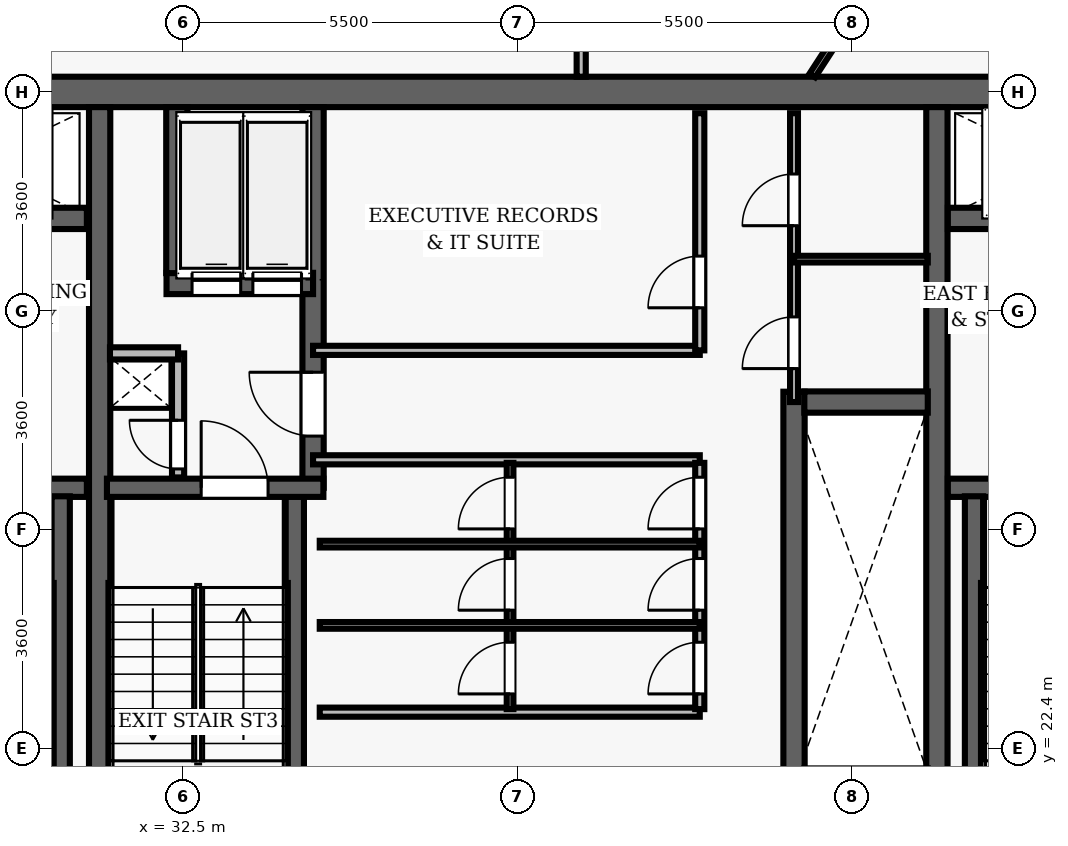
"""IFC4 building model, lengths in metres.
Left out: names, types, materials, properties, quantities, classifications, styles, units other than length and angle.
Written with IfcOpenShell. Run it as: python <this file> out.ifc"""

import sys

from ifc_helpers import new_model, si_unit, direction, frame, frame_2d, origin, place, context, subcontext, project, spatial, rectangle, extrude, element, fill, save


model = new_model("IFC4")
c1 = context("Model", 3, precision=1e-05, world=origin(), true_north=direction((0.0, 1.0)))
c2 = subcontext(c1, "Body", "Model", "MODEL_VIEW")
j1 = project(units=[si_unit("LENGTHUNIT", "METRE"), si_unit("PLANEANGLEUNIT", "RADIAN")], contexts=[c1])
p1 = place(None, origin())
s1 = spatial("IfcSite", under=j1, at=p1, CompositionType="ELEMENT")
p2 = place(p1, origin())
s2 = spatial("IfcBuilding", under=s1, at=p2, CompositionType="ELEMENT")
p3 = place(p2, frame((0.0, 0.0, 225.1)))
s3 = spatial("IfcBuildingStorey", under=s2, at=p3, CompositionType="ELEMENT", Elevation=225.1)
p4 = place(p3, frame((26.75, 33.2, 0.0), z_axis=(0.0, 0.0, 1.0), x_axis=(1.0, 0.0, 0.0)))
e1 = element("IfcWall", 1, at=p4, inside=s3, PredefinedType="SHEAR", context=c2, shape_type="SweptSolid", body=[
    extrude(rectangle(XDim=22.5, YDim=0.5, at=frame_2d((11.25, 0.0))), origin(), (0.0, 0.0, 1.0), 3.85),
])
for number, where, z_axis, x_axis in (
    (2, (31.13, 19.05, 0.0), (0.0, 0.0, 1.0), (0.0, 1.0, 0.0)),
    (3, (44.9, 19.05, 0.0), (0.0, 0.0, 1.0), (0.0, 1.0, 0.0)),
):
    element("IfcWall", number, at=place(p3, frame(where, z_axis=z_axis, x_axis=x_axis)), inside=s3, PredefinedType="SHEAR", context=c2, shape_type="SweptSolid", body=[
        extrude(rectangle(XDim=13.9, YDim=0.35, at=frame_2d((6.95, 0.0))), origin(), (0.0, 0.0, 1.0), 3.85),
    ])
p5 = place(p3, frame((27.25, 26.69, 0.0), z_axis=(0.0, 0.0, 1.0), x_axis=(1.0, 0.0, 0.0)))
e4 = element("IfcWall", 4, at=p5, inside=s3, PredefinedType="SHEAR", context=c2, shape_type="SweptSolid", body=[
    extrude(rectangle(XDim=3.67, YDim=0.3, at=frame_2d((1.835, 0.0))), origin(), (0.0, 0.0, 1.0), 3.85),
])
p6 = place(p5, frame((1.05, 0.0, 0.0)))
e5 = element("IfcOpeningElement", 5, at=p6, cuts=e4, PredefinedType="OPENING", context=c2, shape_type="SweptSolid", body=[
    extrude(rectangle(XDim=1.1, YDim=2.15, at=frame_2d((0.55, 1.075))), frame((0.0, 0.16, 0.0), z_axis=(0.0, -1.0, 0.0), x_axis=(1.0, 0.0, 0.0)), (0.0, 0.0, 1.0), 0.32),
])
p7 = place(p3, frame((30.49, 19.05, 0.0), z_axis=(0.0, 0.0, 1.0), x_axis=(0.0, 1.0, 0.0)))
e6 = element("IfcWall", 6, at=p7, inside=s3, PredefinedType="SHEAR", context=c2, shape_type="SweptSolid", body=[
    extrude(rectangle(XDim=7.5, YDim=0.3, at=frame_2d((3.75, 0.0))), origin(), (0.0, 0.0, 1.0), 3.85),
])
p8 = place(p3, frame((27.25, 31.12, 0.0), z_axis=(0.0, 0.0, 1.0), x_axis=(1.0, 0.0, 0.0)))
e7 = element("IfcWall", 7, at=p8, inside=s3, PredefinedType="SHEAR", context=c2, shape_type="SweptSolid", body=[
    extrude(rectangle(XDim=3.67, YDim=0.35, at=frame_2d((1.835, 0.0))), origin(), (0.0, 0.0, 1.0), 3.035),
])
p9 = place(p8, frame((1.25, 0.0, 0.0)))
e8 = element("IfcOpeningElement", 8, at=p9, cuts=e7, PredefinedType="OPENING", context=c2, shape_type="SweptSolid", body=[
    extrude(rectangle(XDim=1.1, YDim=2.15, at=frame_2d((0.55, 1.075))), frame((0.0, 0.185, 0.0), z_axis=(0.0, -1.0, 0.0), x_axis=(1.0, 0.0, 0.0)), (0.0, 0.0, 1.0), 0.37),
])
p10 = place(p3, frame((45.08, 26.69, 0.0), z_axis=(0.0, 0.0, 1.0), x_axis=(1.0, 0.0, 0.0)))
e9 = element("IfcWall", 9, at=p10, inside=s3, PredefinedType="SHEAR", context=c2, shape_type="SweptSolid", body=[
    extrude(rectangle(XDim=3.67, YDim=0.3, at=frame_2d((1.835, 0.0))), origin(), (0.0, 0.0, 1.0), 3.85),
])
p11 = place(p10, frame((1.05, 0.0, 0.0)))
e10 = element("IfcOpeningElement", 10, at=p11, cuts=e9, PredefinedType="OPENING", context=c2, shape_type="SweptSolid", body=[
    extrude(rectangle(XDim=1.1, YDim=2.15, at=frame_2d((0.55, 1.075))), frame((0.0, 0.16, 0.0), z_axis=(0.0, -1.0, 0.0), x_axis=(1.0, 0.0, 0.0)), (0.0, 0.0, 1.0), 0.32),
])
p12 = place(p3, frame((45.51, 19.05, 0.0), z_axis=(0.0, 0.0, 1.0), x_axis=(0.0, 1.0, 0.0)))
e11 = element("IfcWall", 11, at=p12, inside=s3, PredefinedType="SHEAR", context=c2, shape_type="SweptSolid", body=[
    extrude(rectangle(XDim=7.5, YDim=0.3, at=frame_2d((3.75, 0.0))), origin(), (0.0, 0.0, 1.0), 3.85),
])
p13 = place(p3, frame((45.08, 31.12, 0.0), z_axis=(0.0, 0.0, 1.0), x_axis=(1.0, 0.0, 0.0)))
e12 = element("IfcWall", 12, at=p13, inside=s3, PredefinedType="SHEAR", context=c2, shape_type="SweptSolid", body=[
    extrude(rectangle(XDim=3.67, YDim=0.35, at=frame_2d((1.835, 0.0))), origin(), (0.0, 0.0, 1.0), 3.035),
])
p14 = place(p13, frame((1.25, 0.0, 0.0)))
e13 = element("IfcOpeningElement", 13, at=p14, cuts=e12, PredefinedType="OPENING", context=c2, shape_type="SweptSolid", body=[
    extrude(rectangle(XDim=1.1, YDim=2.15, at=frame_2d((0.55, 1.075))), frame((0.0, 0.185, 0.0), z_axis=(0.0, -1.0, 0.0), x_axis=(1.0, 0.0, 0.0)), (0.0, 0.0, 1.0), 0.37),
])
p15 = place(p3, frame((34.34, 19.05, 0.0), z_axis=(0.0, 0.0, 1.0), x_axis=(0.0, 1.0, 0.0)))
e14 = element("IfcWall", 14, at=p15, inside=s3, PredefinedType="SHEAR", context=c2, shape_type="SweptSolid", body=[
    extrude(rectangle(XDim=7.5, YDim=0.3, at=frame_2d((3.75, 0.0))), origin(), (0.0, 0.0, 1.0), 3.85),
])
p16 = place(p3, frame((34.64, 26.69, 0.0), z_axis=(0.0, 0.0, 1.0), x_axis=(0.0, 1.0, 0.0)))
e15 = element("IfcWall", 15, at=p16, inside=s3, PredefinedType="SHEAR", context=c2, shape_type="SweptSolid", body=[
    extrude(rectangle(XDim=6.26, YDim=0.35, at=frame_2d((3.13, 0.0))), origin(), (0.0, 0.0, 1.0), 3.85),
])
p17 = place(p16, frame((0.85, 0.0, 0.0)))
e16 = element("IfcOpeningElement", 16, at=p17, cuts=e15, PredefinedType="OPENING", context=c2, shape_type="SweptSolid", body=[
    extrude(rectangle(XDim=1.05, YDim=2.15, at=frame_2d((0.525, 1.075))), frame((0.0, 0.185, 0.0), z_axis=(0.0, -1.0, 0.0), x_axis=(1.0, 0.0, 0.0)), (0.0, 0.0, 1.0), 0.37),
])
p18 = place(p3, frame((31.25, 26.69, 0.0), z_axis=(0.0, 0.0, 1.0), x_axis=(1.0, 0.0, 0.0)))
e17 = element("IfcWall", 17, at=p18, inside=s3, PredefinedType="SHEAR", context=c2, shape_type="SweptSolid", body=[
    extrude(rectangle(XDim=3.56, YDim=0.3, at=frame_2d((1.78, 0.0))), origin(), (0.0, 0.0, 1.0), 3.85),
])
p19 = place(p18, frame((1.55, 0.0, 0.0)))
e18 = element("IfcOpeningElement", 18, at=p19, cuts=e17, PredefinedType="OPENING", context=c2, shape_type="SweptSolid", body=[
    extrude(rectangle(XDim=1.1, YDim=2.15, at=frame_2d((0.55, 1.075))), frame((0.0, 0.16, 0.0), z_axis=(0.0, -1.0, 0.0), x_axis=(1.0, 0.0, 0.0)), (0.0, 0.0, 1.0), 0.32),
])
p20 = place(p3, frame((32.23, 30.05, 0.0), z_axis=(0.0, 0.0, 1.0), x_axis=(1.0, 0.0, 0.0)))
e19 = element("IfcWall", 19, at=p20, inside=s3, PredefinedType="SHEAR", context=c2, shape_type="SweptSolid", body=[
    extrude(rectangle(XDim=2.41, YDim=0.35, at=frame_2d((1.205, 0.0))), origin(), (0.0, 0.0, 1.0), 3.035),
])
p21 = place(p20, frame((0.42, 0.0, 0.0)))
e20 = element("IfcOpeningElement", 20, at=p21, cuts=e19, PredefinedType="OPENING", context=c2, shape_type="SweptSolid", body=[
    extrude(rectangle(XDim=0.8, YDim=2.15, at=frame_2d((0.4, 1.075))), frame((0.0, 0.185, 0.0), z_axis=(0.0, -1.0, 0.0), x_axis=(1.0, 0.0, 0.0)), (0.0, 0.0, 1.0), 0.37),
])
p22 = place(p20, frame((1.42, 0.0, 0.0)))
e21 = element("IfcOpeningElement", 21, at=p22, cuts=e19, PredefinedType="OPENING", context=c2, shape_type="SweptSolid", body=[
    extrude(rectangle(XDim=0.8, YDim=2.15, at=frame_2d((0.4, 1.075))), frame((0.0, 0.185, 0.0), z_axis=(0.0, -1.0, 0.0), x_axis=(1.0, 0.0, 0.0)), (0.0, 0.0, 1.0), 0.37),
])
p23 = place(p3, frame((32.4, 30.22, 0.0), z_axis=(0.0, 0.0, 1.0), x_axis=(0.0, 1.0, 0.0)))
e22 = element("IfcWall", 22, at=p23, inside=s3, PredefinedType="SHEAR", context=c2, shape_type="SweptSolid", body=[
    extrude(rectangle(XDim=2.73, YDim=0.35, at=frame_2d((1.365, 0.0))), origin(), (0.0, 0.0, 1.0), 3.035),
])
p24 = place(p3, frame((32.42, 26.86, 0.0), z_axis=(0.0, 0.0, 1.0), x_axis=(0.0, 1.0, 0.0)))
e23 = element("IfcWall", 23, at=p24, inside=s3, PredefinedType="PARTITIONING", context=c2, shape_type="SweptSolid", body=[
    extrude(rectangle(XDim=2.04, YDim=0.2, at=frame_2d((1.02, 0.0))), origin(), (0.0, 0.0, 1.0), 3.035),
])
p25 = place(p24, frame((0.14, 0.0, 0.0)))
e24 = element("IfcOpeningElement", 24, at=p25, cuts=e23, PredefinedType="OPENING", context=c2, shape_type="SweptSolid", body=[
    extrude(rectangle(XDim=0.8, YDim=2.05, at=frame_2d((0.4, 1.025))), frame((0.0, 0.11, 0.0), z_axis=(0.0, -1.0, 0.0), x_axis=(1.0, 0.0, 0.0)), (0.0, 0.0, 1.0), 0.22),
])
p26 = place(p3, frame((31.3, 28.9, 0.0), z_axis=(0.0, 0.0, 1.0), x_axis=(1.0, 0.0, 0.0)))
e25 = element("IfcWall", 25, at=p26, inside=s3, PredefinedType="PARTITIONING", context=c2, shape_type="SweptSolid", body=[
    extrude(rectangle(XDim=1.12, YDim=0.2, at=frame_2d((0.56, 0.0))), origin(), (0.0, 0.0, 1.0), 3.035),
])
p27 = place(p3, frame((42.55, 21.73, 0.0), z_axis=(0.0, 0.0, 1.0), x_axis=(0.0, 1.0, 0.0)))
e26 = element("IfcWall", 26, at=p27, inside=s3, PredefinedType="SHEAR", context=c2, shape_type="SweptSolid", body=[
    extrude(rectangle(XDim=6.54, YDim=0.35, at=frame_2d((3.27, 0.0))), origin(), (0.0, 0.0, 1.0), 3.035),
])
p28 = place(p3, frame((42.72, 28.1, 0.0), z_axis=(0.0, 0.0, 1.0), x_axis=(1.0, 0.0, 0.0)))
e27 = element("IfcWall", 27, at=p28, inside=s3, PredefinedType="SHEAR", context=c2, shape_type="SweptSolid", body=[
    extrude(rectangle(XDim=2.03, YDim=0.35, at=frame_2d((1.015, 0.0))), origin(), (0.0, 0.0, 1.0), 3.035),
])
p29 = place(p3, frame((34.75, 23.0, 0.0), z_axis=(0.0, 0.0, 1.0), x_axis=(1.0, 0.0, 0.0)))
e28 = element("IfcWall", 28, at=p29, inside=s3, PredefinedType="PARTITIONING", context=c2, shape_type="SweptSolid", body=[
    extrude(rectangle(XDim=6.25, YDim=0.15, at=frame_2d((3.125, 0.0))), origin(), (0.0, 0.0, 1.0), 3.035),
])
for number, where, z_axis, x_axis in (
    (29, (34.64, 27.15, 0.0), (0.0, 0.0, 1.0), (1.0, 0.0, 0.0)),
    (30, (34.64, 28.95, 0.0), (0.0, 0.0, 1.0), (1.0, 0.0, 0.0)),
):
    element("IfcWall", number, at=place(p3, frame(where, z_axis=z_axis, x_axis=x_axis)), inside=s3, PredefinedType="PARTITIONING", context=c2, shape_type="SweptSolid", body=[
        extrude(rectangle(XDim=6.36, YDim=0.15, at=frame_2d((3.18, 0.0))), origin(), (0.0, 0.0, 1.0), 3.035),
    ])
p30 = place(p3, frame((41.0, 28.95, 0.0), z_axis=(0.0, 0.0, 1.0), x_axis=(0.0, 1.0, 0.0)))
e31 = element("IfcWall", 31, at=p30, inside=s3, PredefinedType="PARTITIONING", context=c2, shape_type="SweptSolid", body=[
    extrude(rectangle(XDim=3.9, YDim=0.15, at=frame_2d((1.95, 0.0))), origin(), (0.0, 0.0, 1.0), 3.035),
])
p31 = place(p30, frame((0.7, 0.0, 0.0)))
e32 = element("IfcOpeningElement", 32, at=p31, cuts=e31, PredefinedType="OPENING", context=c2, shape_type="SweptSolid", body=[
    extrude(rectangle(XDim=0.85, YDim=2.1, at=frame_2d((0.425, 1.05))), frame((0.0, 0.085, 0.0), z_axis=(0.0, -1.0, 0.0), x_axis=(1.0, 0.0, 0.0)), (0.0, 0.0, 1.0), 0.17),
])
p32 = place(p3, frame((41.0, 23.05, 0.0), z_axis=(0.0, 0.0, 1.0), x_axis=(0.0, 1.0, 0.0)))
e33 = element("IfcWall", 33, at=p32, inside=s3, PredefinedType="PARTITIONING", context=c2, shape_type="SweptSolid", body=[
    extrude(rectangle(XDim=4.05, YDim=0.15, at=frame_2d((2.025, 0.0))), origin(), (0.0, 0.0, 1.0), 3.035),
])
p33 = place(p32, frame((0.25, 0.0, 0.0)))
e34 = element("IfcOpeningElement", 34, at=p33, cuts=e33, PredefinedType="OPENING", context=c2, shape_type="SweptSolid", body=[
    extrude(rectangle(XDim=0.85, YDim=2.1, at=frame_2d((0.425, 1.05))), frame((0.0, 0.085, 0.0), z_axis=(0.0, -1.0, 0.0), x_axis=(1.0, 0.0, 0.0)), (0.0, 0.0, 1.0), 0.17),
])
p34 = place(p32, frame((1.627, 0.0, 0.0)))
e35 = element("IfcOpeningElement", 35, at=p34, cuts=e33, PredefinedType="OPENING", context=c2, shape_type="SweptSolid", body=[
    extrude(rectangle(XDim=0.85, YDim=2.1, at=frame_2d((0.425, 1.05))), frame((0.0, 0.085, 0.0), z_axis=(0.0, -1.0, 0.0), x_axis=(1.0, 0.0, 0.0)), (0.0, 0.0, 1.0), 0.17),
])
p35 = place(p32, frame((2.963, 0.0, 0.0)))
e36 = element("IfcOpeningElement", 36, at=p35, cuts=e33, PredefinedType="OPENING", context=c2, shape_type="SweptSolid", body=[
    extrude(rectangle(XDim=0.85, YDim=2.1, at=frame_2d((0.425, 1.05))), frame((0.0, 0.085, 0.0), z_axis=(0.0, -1.0, 0.0), x_axis=(1.0, 0.0, 0.0)), (0.0, 0.0, 1.0), 0.17),
])
p36 = place(p3, frame((37.88, 23.05, 0.0), z_axis=(0.0, 0.0, 1.0), x_axis=(0.0, 1.0, 0.0)))
e37 = element("IfcWall", 37, at=p36, inside=s3, PredefinedType="PARTITIONING", context=c2, shape_type="SweptSolid", body=[
    extrude(rectangle(XDim=4.05, YDim=0.11, at=frame_2d((2.025, 0.0))), origin(), (0.0, 0.0, 1.0), 3.035),
])
p37 = place(p36, frame((0.25, 0.0, 0.0)))
e38 = element("IfcOpeningElement", 38, at=p37, cuts=e37, PredefinedType="OPENING", context=c2, shape_type="SweptSolid", body=[
    extrude(rectangle(XDim=0.85, YDim=2.1, at=frame_2d((0.425, 1.05))), frame((0.0, 0.065, 0.0), z_axis=(0.0, -1.0, 0.0), x_axis=(1.0, 0.0, 0.0)), (0.0, 0.0, 1.0), 0.13),
])
p38 = place(p36, frame((1.627, 0.0, 0.0)))
e39 = element("IfcOpeningElement", 39, at=p38, cuts=e37, PredefinedType="OPENING", context=c2, shape_type="SweptSolid", body=[
    extrude(rectangle(XDim=0.85, YDim=2.1, at=frame_2d((0.425, 1.05))), frame((0.0, 0.065, 0.0), z_axis=(0.0, -1.0, 0.0), x_axis=(1.0, 0.0, 0.0)), (0.0, 0.0, 1.0), 0.13),
])
p39 = place(p36, frame((2.963, 0.0, 0.0)))
e40 = element("IfcOpeningElement", 40, at=p39, cuts=e37, PredefinedType="OPENING", context=c2, shape_type="SweptSolid", body=[
    extrude(rectangle(XDim=0.85, YDim=2.1, at=frame_2d((0.425, 1.05))), frame((0.0, 0.065, 0.0), z_axis=(0.0, -1.0, 0.0), x_axis=(1.0, 0.0, 0.0)), (0.0, 0.0, 1.0), 0.13),
])
for number, where, z_axis, x_axis in (
    (41, (34.75, 24.427, 0.0), (0.0, 0.0, 1.0), (1.0, 0.0, 0.0)),
    (42, (34.75, 25.763, 0.0), (0.0, 0.0, 1.0), (1.0, 0.0, 0.0)),
):
    element("IfcWall", number, at=place(p3, frame(where, z_axis=z_axis, x_axis=x_axis)), inside=s3, PredefinedType="PARTITIONING", context=c2, shape_type="SweptSolid", body=[
        extrude(rectangle(XDim=6.25, YDim=0.11, at=frame_2d((3.125, 0.0))), origin(), (0.0, 0.0, 1.0), 3.035),
    ])
p40 = place(p3, frame((42.55, 28.1, 0.0), z_axis=(0.0, 0.0, 1.0), x_axis=(0.0, 1.0, 0.0)))
e43 = element("IfcWall", 43, at=p40, inside=s3, PredefinedType="PARTITIONING", context=c2, shape_type="SweptSolid", body=[
    extrude(rectangle(XDim=4.75, YDim=0.13, at=frame_2d((2.375, 0.0))), origin(), (0.0, 0.0, 1.0), 3.035),
])
p41 = place(p40, frame((0.55, 0.0, 0.0)))
e44 = element("IfcOpeningElement", 44, at=p41, cuts=e43, PredefinedType="OPENING", context=c2, shape_type="SweptSolid", body=[
    extrude(rectangle(XDim=0.85, YDim=2.1, at=frame_2d((0.425, 1.05))), frame((0.0, 0.075, 0.0), z_axis=(0.0, -1.0, 0.0), x_axis=(1.0, 0.0, 0.0)), (0.0, 0.0, 1.0), 0.15),
])
p42 = place(p40, frame((2.9, 0.0, 0.0)))
e45 = element("IfcOpeningElement", 45, at=p42, cuts=e43, PredefinedType="OPENING", context=c2, shape_type="SweptSolid", body=[
    extrude(rectangle(XDim=0.85, YDim=2.1, at=frame_2d((0.425, 1.05))), frame((0.0, 0.075, 0.0), z_axis=(0.0, -1.0, 0.0), x_axis=(1.0, 0.0, 0.0)), (0.0, 0.0, 1.0), 0.15),
])
p43 = place(p3, frame((42.55, 30.45, 0.0), z_axis=(0.0, 0.0, 1.0), x_axis=(1.0, 0.0, 0.0)))
e46 = element("IfcWall", 46, at=p43, inside=s3, PredefinedType="PARTITIONING", context=c2, shape_type="SweptSolid", body=[
    extrude(rectangle(XDim=2.2, YDim=0.11, at=frame_2d((1.1, 0.0))), origin(), (0.0, 0.0, 1.0), 3.035),
])
p44 = place(p3, frame((39.05, 33.45, 0.0), z_axis=(0.0, 0.0, 1.0), x_axis=(0.0, 1.0, 0.0)))
e47 = element("IfcWall", 47, at=p44, inside=s3, PredefinedType="PARTITIONING", context=c2, shape_type="SweptSolid", body=[
    extrude(rectangle(XDim=6.95, YDim=0.15, at=frame_2d((3.475, 0.0))), origin(), (0.0, 0.0, 1.0), 3.035),
])
p45 = place(p44, frame((1.262, 0.0, 0.0)))
e48 = element("IfcOpeningElement", 48, at=p45, cuts=e47, PredefinedType="OPENING", context=c2, shape_type="SweptSolid", body=[
    extrude(rectangle(XDim=0.95, YDim=2.15, at=frame_2d((0.475, 1.075))), frame((0.0, 0.085, 0.0), z_axis=(0.0, -1.0, 0.0), x_axis=(1.0, 0.0, 0.0)), (0.0, 0.0, 1.0), 0.17),
])
p46 = place(p3, frame((42.851, 33.47, 0.0), z_axis=(0.0, 0.0, 1.0), x_axis=(0.544639202203, 0.838670459372, 0.0)))
e49 = element("IfcWall", 49, at=p46, inside=s3, PredefinedType="PARTITIONING", context=c2, shape_type="SweptSolid", body=[
    extrude(rectangle(XDim=12.684, YDim=0.11, at=frame_2d((6.342, 0.0))), origin(), (0.0, 0.0, 1.0), 3.035),
])
p47 = place(p19, origin())
e50 = element("IfcDoor", 50, at=p47, inside=s3, OperationType="SINGLE_SWING_LEFT", PredefinedType="DOOR", context=c2, shape_type="SweptSolid", body=[
    extrude(rectangle(XDim=1.1, YDim=2.15, at=frame_2d((0.55, 1.075))), frame((0.0, 0.025, 0.0), z_axis=(0.0, -1.0, 0.0), x_axis=(1.0, 0.0, 0.0)), (0.0, 0.0, 1.0), 0.05),
])
fill(e18, e50)
p48 = place(p25, origin())
e51 = element("IfcDoor", 51, at=p48, inside=s3, OperationType="SINGLE_SWING_RIGHT", PredefinedType="DOOR", context=c2, shape_type="SweptSolid", body=[
    extrude(rectangle(XDim=0.8, YDim=2.05, at=frame_2d((0.4, 1.025))), frame((0.0, 0.025, 0.0), z_axis=(0.0, -1.0, 0.0), x_axis=(1.0, 0.0, 0.0)), (0.0, 0.0, 1.0), 0.05),
])
fill(e24, e51)
p49 = place(p17, origin())
e52 = element("IfcDoor", 52, at=p49, inside=s3, OperationType="SINGLE_SWING_RIGHT", PredefinedType="DOOR", context=c2, shape_type="SweptSolid", body=[
    extrude(rectangle(XDim=1.05, YDim=2.15, at=frame_2d((0.525, 1.075))), frame((0.0, 0.025, 0.0), z_axis=(0.0, -1.0, 0.0), x_axis=(1.0, 0.0, 0.0)), (0.0, 0.0, 1.0), 0.05),
])
fill(e16, e52)
p50 = place(p31, origin())
e53 = element("IfcDoor", 53, at=p50, inside=s3, OperationType="SINGLE_SWING_LEFT", PredefinedType="DOOR", context=c2, shape_type="SweptSolid", body=[
    extrude(rectangle(XDim=0.85, YDim=2.1, at=frame_2d((0.425, 1.05))), frame((0.0, 0.025, 0.0), z_axis=(0.0, -1.0, 0.0), x_axis=(1.0, 0.0, 0.0)), (0.0, 0.0, 1.0), 0.05),
])
fill(e32, e53)
p51 = place(p33, origin())
e54 = element("IfcDoor", 54, at=p51, inside=s3, OperationType="SINGLE_SWING_LEFT", PredefinedType="DOOR", context=c2, shape_type="SweptSolid", body=[
    extrude(rectangle(XDim=0.85, YDim=2.1, at=frame_2d((0.425, 1.05))), frame((0.0, 0.025, 0.0), z_axis=(0.0, -1.0, 0.0), x_axis=(1.0, 0.0, 0.0)), (0.0, 0.0, 1.0), 0.05),
])
fill(e34, e54)
p52 = place(p37, origin())
e55 = element("IfcDoor", 55, at=p52, inside=s3, OperationType="SINGLE_SWING_LEFT", PredefinedType="DOOR", context=c2, shape_type="SweptSolid", body=[
    extrude(rectangle(XDim=0.85, YDim=2.1, at=frame_2d((0.425, 1.05))), frame((0.0, 0.025, 0.0), z_axis=(0.0, -1.0, 0.0), x_axis=(1.0, 0.0, 0.0)), (0.0, 0.0, 1.0), 0.05),
])
fill(e38, e55)
p53 = place(p34, origin())
e56 = element("IfcDoor", 56, at=p53, inside=s3, OperationType="SINGLE_SWING_LEFT", PredefinedType="DOOR", context=c2, shape_type="SweptSolid", body=[
    extrude(rectangle(XDim=0.85, YDim=2.1, at=frame_2d((0.425, 1.05))), frame((0.0, 0.025, 0.0), z_axis=(0.0, -1.0, 0.0), x_axis=(1.0, 0.0, 0.0)), (0.0, 0.0, 1.0), 0.05),
])
fill(e35, e56)
p54 = place(p38, origin())
e57 = element("IfcDoor", 57, at=p54, inside=s3, OperationType="SINGLE_SWING_LEFT", PredefinedType="DOOR", context=c2, shape_type="SweptSolid", body=[
    extrude(rectangle(XDim=0.85, YDim=2.1, at=frame_2d((0.425, 1.05))), frame((0.0, 0.025, 0.0), z_axis=(0.0, -1.0, 0.0), x_axis=(1.0, 0.0, 0.0)), (0.0, 0.0, 1.0), 0.05),
])
fill(e39, e57)
p55 = place(p35, origin())
e58 = element("IfcDoor", 58, at=p55, inside=s3, OperationType="SINGLE_SWING_LEFT", PredefinedType="DOOR", context=c2, shape_type="SweptSolid", body=[
    extrude(rectangle(XDim=0.85, YDim=2.1, at=frame_2d((0.425, 1.05))), frame((0.0, 0.025, 0.0), z_axis=(0.0, -1.0, 0.0), x_axis=(1.0, 0.0, 0.0)), (0.0, 0.0, 1.0), 0.05),
])
fill(e36, e58)
p56 = place(p39, origin())
e59 = element("IfcDoor", 59, at=p56, inside=s3, OperationType="SINGLE_SWING_LEFT", PredefinedType="DOOR", context=c2, shape_type="SweptSolid", body=[
    extrude(rectangle(XDim=0.85, YDim=2.1, at=frame_2d((0.425, 1.05))), frame((0.0, 0.025, 0.0), z_axis=(0.0, -1.0, 0.0), x_axis=(1.0, 0.0, 0.0)), (0.0, 0.0, 1.0), 0.05),
])
fill(e40, e59)
p57 = place(p41, origin())
e60 = element("IfcDoor", 60, at=p57, inside=s3, OperationType="SINGLE_SWING_LEFT", PredefinedType="DOOR", context=c2, shape_type="SweptSolid", body=[
    extrude(rectangle(XDim=0.85, YDim=2.1, at=frame_2d((0.425, 1.05))), frame((0.0, 0.025, 0.0), z_axis=(0.0, -1.0, 0.0), x_axis=(1.0, 0.0, 0.0)), (0.0, 0.0, 1.0), 0.05),
])
fill(e44, e60)
p58 = place(p42, origin())
e61 = element("IfcDoor", 61, at=p58, inside=s3, OperationType="SINGLE_SWING_LEFT", PredefinedType="DOOR", context=c2, shape_type="SweptSolid", body=[
    extrude(rectangle(XDim=0.85, YDim=2.1, at=frame_2d((0.425, 1.05))), frame((0.0, 0.025, 0.0), z_axis=(0.0, -1.0, 0.0), x_axis=(1.0, 0.0, 0.0)), (0.0, 0.0, 1.0), 0.05),
])
fill(e45, e61)
p59 = place(p21, origin())
e62 = element("IfcDoor", 62, at=p59, inside=s3, OperationType="SLIDING_TO_LEFT", PredefinedType="DOOR", context=c2, shape_type="SweptSolid", body=[
    extrude(rectangle(XDim=0.8, YDim=2.15, at=frame_2d((0.4, 1.075))), frame((0.0, 0.025, 0.0), z_axis=(0.0, -1.0, 0.0), x_axis=(1.0, 0.0, 0.0)), (0.0, 0.0, 1.0), 0.05),
])
fill(e20, e62)
p60 = place(p22, origin())
e63 = element("IfcDoor", 63, at=p60, inside=s3, OperationType="SLIDING_TO_LEFT", PredefinedType="DOOR", context=c2, shape_type="SweptSolid", body=[
    extrude(rectangle(XDim=0.8, YDim=2.15, at=frame_2d((0.4, 1.075))), frame((0.0, 0.025, 0.0), z_axis=(0.0, -1.0, 0.0), x_axis=(1.0, 0.0, 0.0)), (0.0, 0.0, 1.0), 0.05),
])
fill(e21, e63)
save(model, sys.argv[1])
